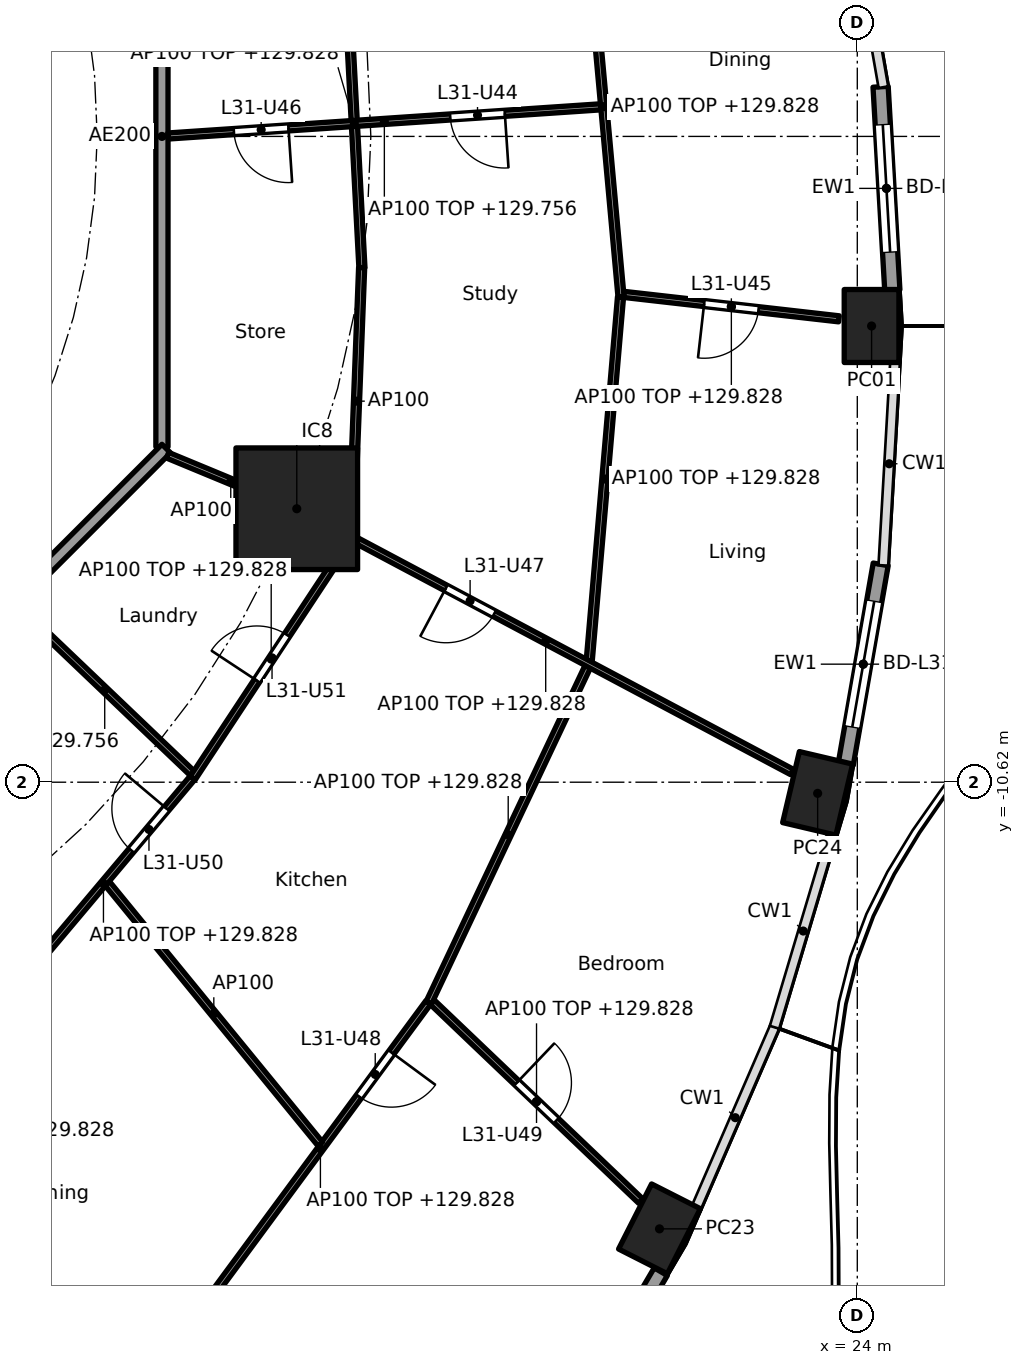
"""IFC4 building model, lengths in metres.
Left out: names, types, materials, properties, quantities, classifications, styles, units other than length and angle.
Written with IfcOpenShell. Run it as: python <this file> out.ifc"""

import sys

from ifc_helpers import new_model, si_unit, direction, frame, frame_2d, origin, origin_2d, place, context, subcontext, project, spatial, rectangle, hollow_rectangle, extrude, element, fill, save


model = new_model("IFC4")
c1 = context("Model", 3, precision=1e-05, world=origin(), true_north=direction((0.0, 1.0)))
c2 = subcontext(c1, "Body", "Model", "MODEL_VIEW")
j1 = project(units=[si_unit("LENGTHUNIT", "METRE"), si_unit("PLANEANGLEUNIT", "RADIAN")], contexts=[c1])
p1 = place(None, origin())
s1 = spatial("IfcSite", under=j1, at=p1, CompositionType="ELEMENT")
p2 = place(p1, origin())
s2 = spatial("IfcBuilding", under=s1, at=p2, CompositionType="ELEMENT")
p3 = place(p2, frame((0.0, 0.0, 127.0)))
s3 = spatial("IfcBuildingStorey", under=s2, at=p3, CompositionType="ELEMENT", Elevation=127.0)
for number, where, z_axis, x_axis in (
    (1, (24.235, -3.118, 0.0), (0.0, 0.0, 1.0), (0.0, 1.0, 0.0)),
    (2, (20.747, -17.965, 0.0), (0.0, 0.0, 1.0), (0.452, 0.892, 0.0)),
    (3, (23.348, -10.803, 0.0), (0.0, 0.0, 1.0), (0.229, 0.973, 0.0)),
):
    element("IfcColumn", number, at=place(p3, frame(where, z_axis=z_axis, x_axis=x_axis)), inside=s3, PredefinedType="COLUMN", context=c2, shape_type="SweptSolid", body=[
        extrude(hollow_rectangle(XDim=1.2, YDim=0.9, WallThickness=0.04, at=origin_2d()), origin(), (0.0, 0.0, 1.0), 3.7),
    ])
p4 = place(p3, frame((14.782, -6.123, 0.0), z_axis=(0.0, 0.0, 1.0), x_axis=(1.0, 0.0, 0.0)))
e4 = element("IfcColumn", 4, at=p4, inside=s3, PredefinedType="COLUMN", context=c2, shape_type="SweptSolid", body=[
    extrude(rectangle(XDim=2.0, YDim=2.0, at=origin_2d()), origin(), (0.0, 0.0, 1.0), 3.7),
])
p5 = place(p3, frame((24.383, 0.816, 0.0), z_axis=(0.0, 0.0, 1.0), x_axis=(0.05746514539, -0.998347513176, 0.0)))
e5 = element("IfcWall", 5, at=p5, inside=s3, PredefinedType="SOLIDWALL", context=c2, shape_type="SweptSolid", body=[
    extrude(rectangle(XDim=3.348, YDim=0.25, at=frame_2d((1.674, 0.0))), origin(), (0.0, 0.0, 1.0), 3.44),
])
p6 = place(p5, frame((0.624, 0.0, 0.0)))
e6 = element("IfcOpeningElement", 6, at=p6, cuts=e5, PredefinedType="OPENING", context=c2, shape_type="SweptSolid", body=[
    extrude(rectangle(XDim=2.1, YDim=2.4, at=frame_2d((1.05, 1.2))), frame((0.0, 0.135, 0.0), z_axis=(0.0, -1.0, 0.0), x_axis=(1.0, 0.0, 0.0)), (0.0, 0.0, 1.0), 0.27),
])
p7 = place(p3, frame((20.768, -18.669, 0.0), z_axis=(0.0, 0.0, 1.0), x_axis=(-0.506314982873, -0.862348617508, 0.0)))
e7 = element("IfcWall", 7, at=p7, inside=s3, PredefinedType="SOLIDWALL", context=c2, shape_type="SweptSolid", body=[
    extrude(rectangle(XDim=3.208, YDim=0.25, at=frame_2d((1.604, 0.0))), origin(), (0.0, 0.0, 1.0), 3.44),
])
p8 = place(p7, frame((0.554, 0.0, 0.0)))
e8 = element("IfcOpeningElement", 8, at=p8, cuts=e7, PredefinedType="OPENING", context=c2, shape_type="SweptSolid", body=[
    extrude(rectangle(XDim=2.1, YDim=2.4, at=frame_2d((1.05, 1.2))), frame((0.0, 0.135, 0.0), z_axis=(0.0, -1.0, 0.0), x_axis=(1.0, 0.0, 0.0)), (0.0, 0.0, 1.0), 0.27),
])
p9 = place(p3, frame((24.385, -7.037, 0.0), z_axis=(0.0, 0.0, 1.0), x_axis=(-0.172163521006, -0.985068384446, 0.0)))
e9 = element("IfcWall", 9, at=p9, inside=s3, PredefinedType="SOLIDWALL", context=c2, shape_type="SweptSolid", body=[
    extrude(rectangle(XDim=3.333, YDim=0.25, at=frame_2d((1.666, 0.0))), origin(), (0.0, 0.0, 1.0), 3.44),
])
p10 = place(p9, frame((0.616, 0.0, 0.0)))
e10 = element("IfcOpeningElement", 10, at=p10, cuts=e9, PredefinedType="OPENING", context=c2, shape_type="SweptSolid", body=[
    extrude(rectangle(XDim=2.1, YDim=2.4, at=frame_2d((1.05, 1.2))), frame((0.0, 0.135, 0.0), z_axis=(0.0, -1.0, 0.0), x_axis=(1.0, 0.0, 0.0)), (0.0, 0.0, 1.0), 0.27),
])
p11 = place(p3, frame((6.14, -14.829, 0.0), z_axis=(0.0, 0.0, 1.0), x_axis=(0.346169582481, -0.938171956608, 0.0)))
e11 = element("IfcWall", 11, at=p11, inside=s3, PredefinedType="PARTITIONING", context=c2, shape_type="SweptSolid", body=[
    extrude(rectangle(XDim=14.354, YDim=0.2, at=frame_2d((7.177, 0.0))), origin(), (0.0, 0.0, 1.0), 2.828),
])
p12 = place(p3, frame((12.565, -5.104, 0.0), z_axis=(0.0, 0.0, 1.0), x_axis=(0.0, 1.0, 0.0)))
e12 = element("IfcWall", 12, at=p12, inside=s3, PredefinedType="PARTITIONING", context=c2, shape_type="SweptSolid", body=[
    extrude(rectangle(XDim=10.209, YDim=0.2, at=frame_2d((5.104, 0.0))), origin(), (0.0, 0.0, 1.0), 3.44),
])
p13 = place(p3, frame((5.275, -12.494, 0.0), z_axis=(0.0, 0.0, 1.0), x_axis=(0.707106781187, 0.707106781187, 0.0)))
e13 = element("IfcWall", 13, at=p13, inside=s3, PredefinedType="PARTITIONING", context=c2, shape_type="SweptSolid", body=[
    extrude(rectangle(XDim=10.409, YDim=0.2, at=frame_2d((5.205, 0.0))), origin(), (0.0, 0.0, 1.0), 3.44),
])
p14 = place(p3, frame((15.853, -2.158, 0.0), z_axis=(0.0, 0.0, 1.0), x_axis=(-0.052483289253, 0.99862180246, 0.0)))
e14 = element("IfcWall", 14, at=p14, inside=s3, PredefinedType="PARTITIONING", context=c2, shape_type="SweptSolid", body=[
    extrude(rectangle(XDim=4.75, YDim=0.1, at=frame_2d((2.375, 0.0))), origin(), (0.0, 0.0, 1.0), 2.828),
])
p15 = place(p3, frame((15.849, -2.158, 0.0), z_axis=(0.0, 0.0, 1.0), x_axis=(-0.038390448414, -0.999262815014, 0.0)))
e15 = element("IfcWall", 15, at=p15, inside=s3, PredefinedType="PARTITIONING", context=c2, shape_type="SweptSolid", body=[
    extrude(rectangle(XDim=4.394, YDim=0.1, at=frame_2d((2.197, 0.0))), origin(), (0.0, 0.0, 1.0), 3.44),
])
p16 = place(p3, frame((20.16, -2.598, 0.0), z_axis=(0.0, 0.0, 1.0), x_axis=(0.993610673305, -0.112861994911, 0.0)))
e16 = element("IfcWall", 16, at=p16, inside=s3, PredefinedType="PARTITIONING", context=c2, shape_type="SweptSolid", body=[
    extrude(rectangle(XDim=3.561, YDim=0.1, at=frame_2d((1.78, 0.0))), origin(), (0.0, 0.0, 1.0), 2.828),
])
p17 = place(p16, frame((1.33, 0.0, 0.0)))
e17 = element("IfcOpeningElement", 17, at=p17, cuts=e16, PredefinedType="OPENING", context=c2, shape_type="SweptSolid", body=[
    extrude(rectangle(XDim=0.9, YDim=2.1, at=frame_2d((0.45, 1.05))), frame((0.0, 0.06, 0.0), z_axis=(0.0, -1.0, 0.0), x_axis=(1.0, 0.0, 0.0)), (0.0, 0.0, 1.0), 0.12),
])
p18 = place(p3, frame((20.115, -2.642, 0.0), z_axis=(0.0, 0.0, 1.0), x_axis=(-0.090563746294, 0.995890660593, 0.0)))
e18 = element("IfcWall", 18, at=p18, inside=s3, PredefinedType="PARTITIONING", context=c2, shape_type="SweptSolid", body=[
    extrude(rectangle(XDim=6.289, YDim=0.1, at=frame_2d((3.145, 0.0))), origin(), (0.0, 0.0, 1.0), 2.828),
])
p19 = place(p18, frame((4.242, 0.0, 0.0)))
e19 = element("IfcOpeningElement", 19, at=p19, cuts=e18, PredefinedType="OPENING", context=c2, shape_type="SweptSolid", body=[
    extrude(rectangle(XDim=0.9, YDim=2.1, at=frame_2d((0.45, 1.05))), frame((0.0, 0.06, 0.0), z_axis=(0.0, -1.0, 0.0), x_axis=(1.0, 0.0, 0.0)), (0.0, 0.0, 1.0), 0.12),
])
p20 = place(p3, frame((20.106, -2.642, 0.0), z_axis=(0.0, 0.0, 1.0), x_axis=(-0.085672025822, -0.996323393277, 0.0)))
e20 = element("IfcWall", 20, at=p20, inside=s3, PredefinedType="PARTITIONING", context=c2, shape_type="SweptSolid", body=[
    extrude(rectangle(XDim=6.007, YDim=0.1, at=frame_2d((3.003, 0.0))), origin(), (0.0, 0.0, 1.0), 2.828),
])
p21 = place(p3, frame((12.665, 0.007, 0.0), z_axis=(0.0, 0.0, 1.0), x_axis=(0.997737186236, 0.067234717233, 0.0)))
e21 = element("IfcWall", 21, at=p21, inside=s3, PredefinedType="PARTITIONING", context=c2, shape_type="SweptSolid", body=[
    extrude(rectangle(XDim=7.132, YDim=0.1, at=frame_2d((3.566, 0.0))), origin(), (0.0, 0.0, 1.0), 2.756),
])
p22 = place(p21, frame((4.651, 0.0, 0.0)))
e22 = element("IfcOpeningElement", 22, at=p22, cuts=e21, PredefinedType="OPENING", context=c2, shape_type="SweptSolid", body=[
    extrude(rectangle(XDim=0.9, YDim=2.1, at=frame_2d((0.45, 1.05))), frame((0.0, 0.06, 0.0), z_axis=(0.0, -1.0, 0.0), x_axis=(1.0, 0.0, 0.0)), (0.0, 0.0, 1.0), 0.12),
])
p23 = place(p21, frame((1.085, 0.0, 0.0)))
e23 = element("IfcOpeningElement", 23, at=p23, cuts=e21, PredefinedType="OPENING", context=c2, shape_type="SweptSolid", body=[
    extrude(rectangle(XDim=0.9, YDim=2.1, at=frame_2d((0.45, 1.05))), frame((0.0, 0.06, 0.0), z_axis=(0.0, -1.0, 0.0), x_axis=(1.0, 0.0, 0.0)), (0.0, 0.0, 1.0), 0.12),
])
p24 = place(p3, frame((10.138, -14.026, 0.0), z_axis=(0.0, 0.0, 1.0), x_axis=(0.644051444483, 0.764982180746, 0.0)))
e24 = element("IfcWall", 24, at=p24, inside=s3, PredefinedType="PARTITIONING", context=c2, shape_type="SweptSolid", body=[
    extrude(rectangle(XDim=4.548, YDim=0.1, at=frame_2d((2.274, 0.0))), origin(), (0.0, 0.0, 1.0), 2.828),
])
p25 = place(p24, frame((2.986, 0.0, 0.0)))
e25 = element("IfcOpeningElement", 25, at=p25, cuts=e24, PredefinedType="OPENING", context=c2, shape_type="SweptSolid", body=[
    extrude(rectangle(XDim=0.9, YDim=2.1, at=frame_2d((0.45, 1.05))), frame((0.0, 0.06, 0.0), z_axis=(0.0, -1.0, 0.0), x_axis=(1.0, 0.0, 0.0)), (0.0, 0.0, 1.0), 0.12),
])
p26 = place(p3, frame((13.397, -19.053, 0.0), z_axis=(0.0, 0.0, 1.0), x_axis=(0.593522299069, 0.804817544856, 0.0)))
e26 = element("IfcWall", 26, at=p26, inside=s3, PredefinedType="PARTITIONING", context=c2, shape_type="SweptSolid", body=[
    extrude(rectangle(XDim=5.976, YDim=0.1, at=frame_2d((2.988, 0.0))), origin(), (0.0, 0.0, 1.0), 2.828),
])
p27 = place(p26, frame((4.057, 0.0, 0.0)))
e27 = element("IfcOpeningElement", 27, at=p27, cuts=e26, PredefinedType="OPENING", context=c2, shape_type="SweptSolid", body=[
    extrude(rectangle(XDim=0.9, YDim=2.1, at=frame_2d((0.45, 1.05))), frame((0.0, 0.06, 0.0), z_axis=(0.0, -1.0, 0.0), x_axis=(1.0, 0.0, 0.0)), (0.0, 0.0, 1.0), 0.12),
])
p28 = place(p3, frame((11.667, -12.287, 0.0), z_axis=(0.0, 0.0, 1.0), x_axis=(0.633038312428, -0.774120465431, 0.0)))
e28 = element("IfcWall", 28, at=p28, inside=s3, PredefinedType="PARTITIONING", context=c2, shape_type="SweptSolid", body=[
    extrude(rectangle(XDim=5.532, YDim=0.1, at=frame_2d((2.766, 0.0))), origin(), (0.0, 0.0, 1.0), 3.44),
])
p29 = place(p3, frame((10.184, -7.727, 0.0), z_axis=(0.0, 0.0, 1.0), x_axis=(0.723654892782, -0.690162007179, 0.0)))
e29 = element("IfcWall", 29, at=p29, inside=s3, PredefinedType="PARTITIONING", context=c2, shape_type="SweptSolid", body=[
    extrude(rectangle(XDim=3.98, YDim=0.1, at=frame_2d((1.99, 0.0))), origin(), (0.0, 0.0, 1.0), 2.756),
])
p30 = place(p3, frame((13.072, -10.55, 0.0), z_axis=(0.0, 0.0, 1.0), x_axis=(0.550614843759, 0.834759422727, 0.0)))
e30 = element("IfcWall", 30, at=p30, inside=s3, PredefinedType="PARTITIONING", context=c2, shape_type="SweptSolid", body=[
    extrude(rectangle(XDim=4.683, YDim=0.1, at=frame_2d((2.341, 0.0))), origin(), (0.0, 0.0, 1.0), 2.828),
])
p31 = place(p30, frame((1.917, 0.0, 0.0)))
e31 = element("IfcOpeningElement", 31, at=p31, cuts=e30, PredefinedType="OPENING", context=c2, shape_type="SweptSolid", body=[
    extrude(rectangle(XDim=0.9, YDim=2.1, at=frame_2d((0.45, 1.05))), frame((0.0, 0.06, 0.0), z_axis=(0.0, -1.0, 0.0), x_axis=(1.0, 0.0, 0.0)), (0.0, 0.0, 1.0), 0.12),
])
p32 = place(p3, frame((17.01, -14.238, 0.0), z_axis=(0.0, 0.0, 1.0), x_axis=(0.723650186498, -0.690166941821, 0.0)))
e32 = element("IfcWall", 32, at=p32, inside=s3, PredefinedType="PARTITIONING", context=c2, shape_type="SweptSolid", body=[
    extrude(rectangle(XDim=4.74, YDim=0.1, at=frame_2d((2.37, 0.0))), origin(), (0.0, 0.0, 1.0), 2.828),
])
p33 = place(p32, frame((1.92, 0.0, 0.0)))
e33 = element("IfcOpeningElement", 33, at=p33, cuts=e32, PredefinedType="OPENING", context=c2, shape_type="SweptSolid", body=[
    extrude(rectangle(XDim=0.9, YDim=2.1, at=frame_2d((0.45, 1.05))), frame((0.0, 0.06, 0.0), z_axis=(0.0, -1.0, 0.0), x_axis=(1.0, 0.0, 0.0)), (0.0, 0.0, 1.0), 0.12),
])
p34 = place(p3, frame((16.953, -14.249, 0.0), z_axis=(0.0, 0.0, 1.0), x_axis=(0.427456178439, 0.904036069808, 0.0)))
e34 = element("IfcWall", 34, at=p34, inside=s3, PredefinedType="PARTITIONING", context=c2, shape_type="SweptSolid", body=[
    extrude(rectangle(XDim=6.113, YDim=0.1, at=frame_2d((3.057, 0.0))), origin(), (0.0, 0.0, 1.0), 2.828),
])
p35 = place(p3, frame((12.657, -5.243, 0.0), z_axis=(0.0, 0.0, 1.0), x_axis=(0.923864733477, -0.382719158442, 0.0)))
e35 = element("IfcWall", 35, at=p35, inside=s3, PredefinedType="PARTITIONING", context=c2, shape_type="SweptSolid", body=[
    extrude(rectangle(XDim=2.25, YDim=0.1, at=frame_2d((1.125, 0.0))), origin(), (0.0, 0.0, 1.0), 3.44),
])
p36 = place(p3, frame((14.826, -6.146, 0.0), z_axis=(0.0, 0.0, 1.0), x_axis=(0.883012998471, -0.469348532044, 0.0)))
e36 = element("IfcWall", 36, at=p36, inside=s3, PredefinedType="PARTITIONING", context=c2, shape_type="SweptSolid", body=[
    extrude(rectangle(XDim=9.172, YDim=0.1, at=frame_2d((4.586, 0.0))), origin(), (0.0, 0.0, 1.0), 2.828),
])
p37 = place(p36, frame((2.728, 0.0, 0.0)))
e37 = element("IfcOpeningElement", 37, at=p37, cuts=e36, PredefinedType="OPENING", context=c2, shape_type="SweptSolid", body=[
    extrude(rectangle(XDim=0.9, YDim=2.1, at=frame_2d((0.45, 1.05))), frame((0.0, 0.06, 0.0), z_axis=(0.0, -1.0, 0.0), x_axis=(1.0, 0.0, 0.0)), (0.0, 0.0, 1.0), 0.12),
])
p38 = place(p6, origin())
e38 = element("IfcDoor", 38, at=p38, inside=s3, OperationType="SLIDING_TO_LEFT", PredefinedType="DOOR", context=c2, shape_type="SweptSolid", body=[
    extrude(rectangle(XDim=2.1, YDim=2.4, at=frame_2d((1.05, 1.2))), frame((0.0, 0.025, 0.0), z_axis=(0.0, -1.0, 0.0), x_axis=(1.0, 0.0, 0.0)), (0.0, 0.0, 1.0), 0.05),
])
fill(e6, e38)
p39 = place(p10, origin())
e39 = element("IfcDoor", 39, at=p39, inside=s3, OperationType="SLIDING_TO_LEFT", PredefinedType="DOOR", context=c2, shape_type="SweptSolid", body=[
    extrude(rectangle(XDim=2.1, YDim=2.4, at=frame_2d((1.05, 1.2))), frame((0.0, 0.025, 0.0), z_axis=(0.0, -1.0, 0.0), x_axis=(1.0, 0.0, 0.0)), (0.0, 0.0, 1.0), 0.05),
])
fill(e10, e39)
p40 = place(p22, frame((0.9, 0.0, 0.0), x_axis=(-1.0, 0.0, 0.0)))
e40 = element("IfcDoor", 40, at=p40, inside=s3, OperationType="SINGLE_SWING_LEFT", PredefinedType="DOOR", context=c2, shape_type="SweptSolid", body=[
    extrude(rectangle(XDim=0.9, YDim=2.1, at=frame_2d((0.45, 1.05))), frame((0.0, 0.025, 0.0), z_axis=(0.0, -1.0, 0.0), x_axis=(1.0, 0.0, 0.0)), (0.0, 0.0, 1.0), 0.05),
])
fill(e22, e40)
p41 = place(p17, frame((0.9, 0.0, 0.0), x_axis=(-1.0, 0.0, 0.0)))
e41 = element("IfcDoor", 41, at=p41, inside=s3, OperationType="SINGLE_SWING_RIGHT", PredefinedType="DOOR", context=c2, shape_type="SweptSolid", body=[
    extrude(rectangle(XDim=0.9, YDim=2.1, at=frame_2d((0.45, 1.05))), frame((0.0, 0.025, 0.0), z_axis=(0.0, -1.0, 0.0), x_axis=(1.0, 0.0, 0.0)), (0.0, 0.0, 1.0), 0.05),
])
fill(e17, e41)
p42 = place(p23, frame((0.9, 0.0, 0.0), x_axis=(-1.0, 0.0, 0.0)))
e42 = element("IfcDoor", 42, at=p42, inside=s3, OperationType="SINGLE_SWING_LEFT", PredefinedType="DOOR", context=c2, shape_type="SweptSolid", body=[
    extrude(rectangle(XDim=0.9, YDim=2.1, at=frame_2d((0.45, 1.05))), frame((0.0, 0.025, 0.0), z_axis=(0.0, -1.0, 0.0), x_axis=(1.0, 0.0, 0.0)), (0.0, 0.0, 1.0), 0.05),
])
fill(e23, e42)
p43 = place(p37, frame((0.9, 0.0, 0.0), x_axis=(-1.0, 0.0, 0.0)))
e43 = element("IfcDoor", 43, at=p43, inside=s3, OperationType="SINGLE_SWING_RIGHT", PredefinedType="DOOR", context=c2, shape_type="SweptSolid", body=[
    extrude(rectangle(XDim=0.9, YDim=2.1, at=frame_2d((0.45, 1.05))), frame((0.0, 0.025, 0.0), z_axis=(0.0, -1.0, 0.0), x_axis=(1.0, 0.0, 0.0)), (0.0, 0.0, 1.0), 0.05),
])
fill(e37, e43)
p44 = place(p27, frame((0.9, 0.0, 0.0), x_axis=(-1.0, 0.0, 0.0)))
e44 = element("IfcDoor", 44, at=p44, inside=s3, OperationType="SINGLE_SWING_LEFT", PredefinedType="DOOR", context=c2, shape_type="SweptSolid", body=[
    extrude(rectangle(XDim=0.9, YDim=2.1, at=frame_2d((0.45, 1.05))), frame((0.0, 0.025, 0.0), z_axis=(0.0, -1.0, 0.0), x_axis=(1.0, 0.0, 0.0)), (0.0, 0.0, 1.0), 0.05),
])
fill(e27, e44)
p45 = place(p33, origin())
e45 = element("IfcDoor", 45, at=p45, inside=s3, OperationType="SINGLE_SWING_LEFT", PredefinedType="DOOR", context=c2, shape_type="SweptSolid", body=[
    extrude(rectangle(XDim=0.9, YDim=2.1, at=frame_2d((0.45, 1.05))), frame((0.0, 0.025, 0.0), z_axis=(0.0, -1.0, 0.0), x_axis=(1.0, 0.0, 0.0)), (0.0, 0.0, 1.0), 0.05),
])
fill(e33, e45)
p46 = place(p25, origin())
e46 = element("IfcDoor", 46, at=p46, inside=s3, OperationType="SINGLE_SWING_RIGHT", PredefinedType="DOOR", context=c2, shape_type="SweptSolid", body=[
    extrude(rectangle(XDim=0.9, YDim=2.1, at=frame_2d((0.45, 1.05))), frame((0.0, 0.025, 0.0), z_axis=(0.0, -1.0, 0.0), x_axis=(1.0, 0.0, 0.0)), (0.0, 0.0, 1.0), 0.05),
])
fill(e25, e46)
p47 = place(p31, origin())
e47 = element("IfcDoor", 47, at=p47, inside=s3, OperationType="SINGLE_SWING_LEFT", PredefinedType="DOOR", context=c2, shape_type="SweptSolid", body=[
    extrude(rectangle(XDim=0.9, YDim=2.1, at=frame_2d((0.45, 1.05))), frame((0.0, 0.025, 0.0), z_axis=(0.0, -1.0, 0.0), x_axis=(1.0, 0.0, 0.0)), (0.0, 0.0, 1.0), 0.05),
])
fill(e31, e47)
save(model, sys.argv[1])
